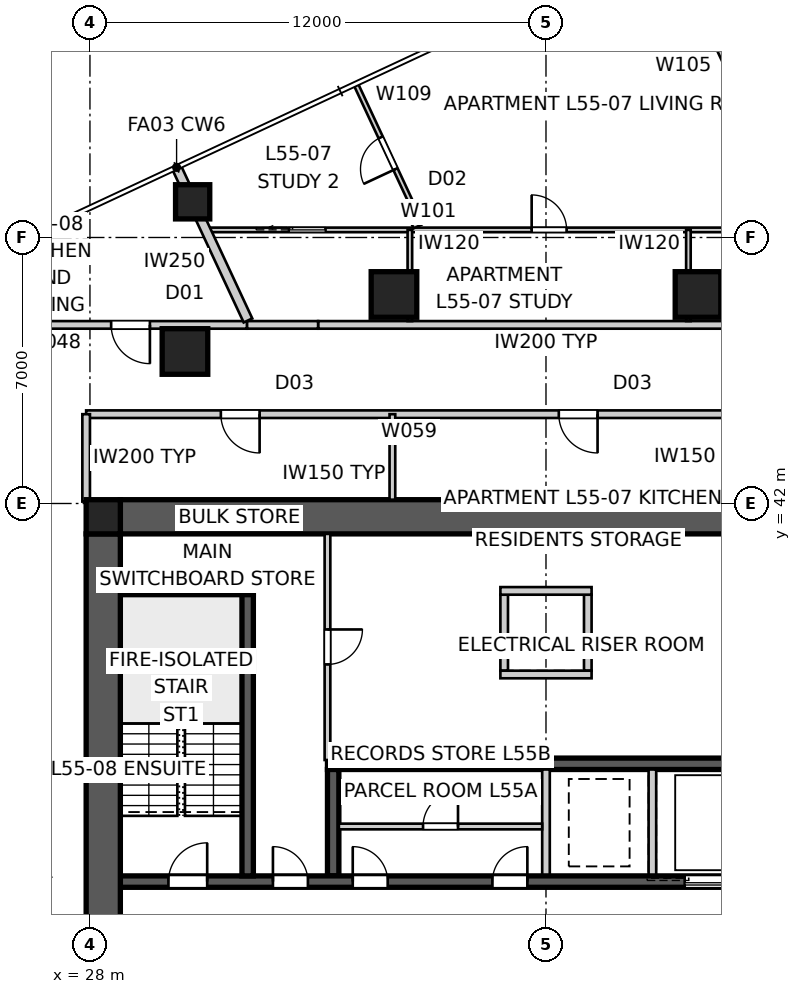
"""IFC4 building model, lengths in metres.
Left out: names, types, materials, properties, quantities, classifications, styles, units other than length and angle.
Written with IfcOpenShell. Run it as: python <this file> out.ifc"""

import sys

from ifc_helpers import new_model, si_unit, direction, frame, frame_2d, origin, origin_2d, place, context, subcontext, project, spatial, polyline, rectangle, outline, extrude, element, fill, save


model = new_model("IFC4")
c1 = context("Model", 3, precision=1e-05, world=origin(), true_north=direction((0.0, 1.0)))
c2 = subcontext(c1, "Body", "Model", "MODEL_VIEW")
j1 = project(units=[si_unit("LENGTHUNIT", "METRE"), si_unit("PLANEANGLEUNIT", "RADIAN")], contexts=[c1])
p1 = place(None, origin())
s1 = spatial("IfcSite", under=j1, at=p1, CompositionType="ELEMENT")
p2 = place(p1, origin())
s2 = spatial("IfcBuilding", under=s1, at=p2, CompositionType="ELEMENT")
p3 = place(p2, frame((0.0, 0.0, 199.8)))
s3 = spatial("IfcBuildingStorey", under=s2, at=p3, CompositionType="ELEMENT", Elevation=199.8)
p4 = place(p3, frame((28.8, 41.65, 0.0), z_axis=(0.0, 0.0, 1.0), x_axis=(1.0, 0.0, 0.0)))
e1 = element("IfcWall", 1, at=p4, inside=s3, PredefinedType="SHEAR", context=c2, shape_type="SweptSolid", body=[
    extrude(outline(polyline([(0.0, -0.45), (22.4, -0.45), (22.4, -0.025), (22.85, -0.025), (22.85, 0.025), (22.4, 0.025), (22.4, 0.45), (0.0, 0.45), (0.0, 0.025), (-0.45, 0.025), (-0.45, -0.025), (0.0, -0.025), (0.0, -0.45)])), origin(), (0.0, 0.0, 1.0), 3.4),
])
p5 = place(p3, frame((28.35, 41.2, 0.0), z_axis=(0.0, 0.0, 1.0), x_axis=(0.0, -1.0, 0.0)))
e2 = element("IfcWall", 2, at=p5, inside=s3, PredefinedType="SHEAR", context=c2, shape_type="SweptSolid", body=[
    extrude(outline(polyline([(0.0, -0.45), (22.4, -0.45), (22.4, -0.025), (22.85, -0.025), (22.85, 0.025), (22.4, 0.025), (22.4, 0.45), (0.0, 0.45), (0.0, 0.025), (-0.45, 0.025), (-0.45, -0.025), (0.0, -0.025), (0.0, -0.45)])), origin(), (0.0, 0.0, 1.0), 3.4),
])
p6 = place(p5, frame((11.14, 0.0, 0.0)))
e3 = element("IfcOpeningElement", 3, at=p6, cuts=e2, PredefinedType="OPENING", context=c2, shape_type="SweptSolid", body=[
    extrude(rectangle(XDim=1.02, YDim=2.4, at=frame_2d((0.51, 1.2))), frame((0.0, 0.46, 0.0), z_axis=(0.0, -1.0, 0.0), x_axis=(1.0, 0.0, 0.0)), (0.0, 0.0, 1.0), 0.92),
])
p7 = place(p3, frame((28.8, 32.05, 0.0), z_axis=(0.0, 0.0, 1.0), x_axis=(1.0, 0.0, 0.0)))
e4 = element("IfcWall", 4, at=p7, inside=s3, PredefinedType="SHEAR", context=c2, shape_type="SweptSolid", body=[
    extrude(rectangle(XDim=22.4, YDim=0.3, at=frame_2d((11.2, 0.0))), origin(), (0.0, 0.0, 1.0), 3.4),
])
p8 = place(p7, frame((19.04, 0.0, 0.0)))
e5 = element("IfcOpeningElement", 5, at=p8, cuts=e4, PredefinedType="OPENING", context=c2, shape_type="SweptSolid", body=[
    extrude(rectangle(XDim=0.92, YDim=2.1, at=frame_2d((0.46, 1.05))), frame((0.0, 0.16, 0.0), z_axis=(0.0, -1.0, 0.0), x_axis=(1.0, 0.0, 0.0)), (0.0, 0.0, 1.0), 0.32),
])
p9 = place(p7, frame((1.265, 0.0, 0.0)))
e6 = element("IfcOpeningElement", 6, at=p9, cuts=e4, PredefinedType="OPENING", context=c2, shape_type="SweptSolid", body=[
    extrude(rectangle(XDim=1.02, YDim=2.1, at=frame_2d((0.51, 1.05))), frame((0.0, 0.16, 0.0), z_axis=(0.0, -1.0, 0.0), x_axis=(1.0, 0.0, 0.0)), (0.0, 0.0, 1.0), 0.32),
])
p10 = place(p7, frame((4.015, 0.0, 0.0)))
e7 = element("IfcOpeningElement", 7, at=p10, cuts=e4, PredefinedType="OPENING", context=c2, shape_type="SweptSolid", body=[
    extrude(rectangle(XDim=0.92, YDim=2.1, at=frame_2d((0.46, 1.05))), frame((0.0, 0.16, 0.0), z_axis=(0.0, -1.0, 0.0), x_axis=(1.0, 0.0, 0.0)), (0.0, 0.0, 1.0), 0.32),
])
p11 = place(p7, frame((6.115, 0.0, 0.0)))
e8 = element("IfcOpeningElement", 8, at=p11, cuts=e4, PredefinedType="OPENING", context=c2, shape_type="SweptSolid", body=[
    extrude(rectangle(XDim=0.92, YDim=2.1, at=frame_2d((0.46, 1.05))), frame((0.0, 0.16, 0.0), z_axis=(0.0, -1.0, 0.0), x_axis=(1.0, 0.0, 0.0)), (0.0, 0.0, 1.0), 0.32),
])
p12 = place(p7, frame((9.79, 0.0, 0.0)))
e9 = element("IfcOpeningElement", 9, at=p12, cuts=e4, PredefinedType="OPENING", context=c2, shape_type="SweptSolid", body=[
    extrude(rectangle(XDim=0.92, YDim=2.1, at=frame_2d((0.46, 1.05))), frame((0.0, 0.16, 0.0), z_axis=(0.0, -1.0, 0.0), x_axis=(1.0, 0.0, 0.0)), (0.0, 0.0, 1.0), 0.32),
])
p13 = place(p7, frame((14.85, 0.0, 0.0)))
e10 = element("IfcOpeningElement", 10, at=p13, cuts=e4, PredefinedType="OPENING", context=c2, shape_type="SweptSolid", body=[
    extrude(rectangle(XDim=1.1, YDim=2.1, at=frame_2d((0.55, 1.05))), frame((0.0, 0.16, 0.0), z_axis=(0.0, -1.0, 0.0), x_axis=(1.0, 0.0, 0.0)), (0.0, 0.0, 1.0), 0.32),
])
p14 = place(p3, frame((34.25, 35.15, 0.0), z_axis=(0.0, 0.0, 1.0), x_axis=(1.0, 0.0, 0.0)))
e11 = element("IfcWall", 11, at=p14, inside=s3, PredefinedType="SHEAR", context=c2, shape_type="SweptSolid", body=[
    extrude(rectangle(XDim=11.5, YDim=0.3, at=frame_2d((5.75, 0.0))), origin(), (0.0, 0.0, 1.0), 3.4),
])
p15 = place(p3, frame((34.4, 32.2, 0.0), z_axis=(0.0, 0.0, 1.0), x_axis=(0.0, 1.0, 0.0)))
e12 = element("IfcWall", 12, at=p15, inside=s3, PredefinedType="SHEAR", context=c2, shape_type="SweptSolid", body=[
    extrude(rectangle(XDim=2.8, YDim=0.3, at=frame_2d((1.4, 0.0))), origin(), (0.0, 0.0, 1.0), 3.4),
])
for number, where, z_axis, x_axis in (
    (13, (40.0, 32.2, 0.0), (0.0, 0.0, 1.0), (0.0, 1.0, 0.0)),
    (14, (42.8, 32.2, 0.0), (0.0, 0.0, 1.0), (0.0, 1.0, 0.0)),
):
    element("IfcWall", number, at=place(p3, frame(where, z_axis=z_axis, x_axis=x_axis)), inside=s3, PredefinedType="SOLIDWALL", context=c2, shape_type="SweptSolid", body=[
        extrude(rectangle(XDim=2.8, YDim=0.2, at=frame_2d((1.4, 0.0))), origin(), (0.0, 0.0, 1.0), 3.4),
    ])
p16 = place(p3, frame((32.15, 32.2, 0.0), z_axis=(0.0, 0.0, 1.0), x_axis=(0.0, 1.0, 0.0)))
e15 = element("IfcWall", 15, at=p16, inside=s3, PredefinedType="SHEAR", context=c2, shape_type="SweptSolid", body=[
    extrude(rectangle(XDim=7.7, YDim=0.3, at=frame_2d((3.85, 0.0))), origin(), (0.0, 0.0, 1.0), 3.4),
])
p17 = place(p3, frame((28.8, 39.75, 0.0), z_axis=(0.0, 0.0, 1.0), x_axis=(1.0, 0.0, 0.0)))
e16 = element("IfcWall", 16, at=p17, inside=s3, PredefinedType="SHEAR", context=c2, shape_type="SweptSolid", body=[
    extrude(rectangle(XDim=3.5, YDim=0.3, at=frame_2d((1.75, 0.0))), origin(), (0.0, 0.0, 1.0), 3.4),
])
for number, where, z_axis, x_axis in (
    (17, (38.9, 37.6, 0.0), (0.0, 0.0, 1.0), (0.0, 1.0, 0.0)),
    (18, (41.1, 37.6, 0.0), (0.0, 0.0, 1.0), (0.0, 1.0, 0.0)),
):
    element("IfcWall", number, at=place(p3, frame(where, z_axis=z_axis, x_axis=x_axis)), inside=s3, PredefinedType="SOLIDWALL", context=c2, shape_type="SweptSolid", body=[
        extrude(rectangle(XDim=2.0, YDim=0.2, at=frame_2d((1.0, 0.0))), origin(), (0.0, 0.0, 1.0), 3.4),
    ])
for number, where, z_axis, x_axis in (
    (19, (38.8, 37.5, 0.0), (0.0, 0.0, 1.0), (1.0, 0.0, 0.0)),
    (20, (38.8, 39.7, 0.0), (0.0, 0.0, 1.0), (1.0, 0.0, 0.0)),
):
    element("IfcWall", number, at=place(p3, frame(where, z_axis=z_axis, x_axis=x_axis)), inside=s3, PredefinedType="SOLIDWALL", context=c2, shape_type="SweptSolid", body=[
        extrude(rectangle(XDim=2.4, YDim=0.2, at=frame_2d((1.2, 0.0))), origin(), (0.0, 0.0, 1.0), 3.4),
    ])
p18 = place(p3, frame((28.35, 41.65, 0.0), z_axis=(0.0, 0.0, 1.0), x_axis=(1.0, 0.0, 0.0)))
e21 = element("IfcColumn", 21, at=p18, inside=s3, PredefinedType="COLUMN", context=c2, shape_type="SweptSolid", body=[
    extrude(rectangle(XDim=0.9, YDim=0.9, at=origin_2d()), origin(), (0.0, 0.0, 1.0), 3.4),
])
p19 = place(p3, frame((30.702, 49.939, 0.0), z_axis=(0.0, 0.0, 1.0), x_axis=(1.0, 0.0, 0.0)))
e22 = element("IfcColumn", 22, at=p19, inside=s3, PredefinedType="COLUMN", context=c2, shape_type="SweptSolid", body=[
    extrude(rectangle(XDim=0.9, YDim=0.9, at=origin_2d()), origin(), (0.0, 0.0, 1.0), 3.2),
])
for number, where, z_axis, x_axis in (
    (23, (44.0, 47.5, 0.0), (0.0, 0.0, 1.0), (1.0, 0.0, 0.0)),
    (24, (36.0, 47.5, 0.0), (0.0, 0.0, 1.0), (1.0, 0.0, 0.0)),
    (25, (30.5, 46.0, 0.0), (0.0, 0.0, 1.0), (1.0, 0.0, 0.0)),
):
    element("IfcColumn", number, at=place(p3, frame(where, z_axis=z_axis, x_axis=x_axis)), inside=s3, PredefinedType="COLUMN", context=c2, shape_type="SweptSolid", body=[
        extrude(rectangle(XDim=1.2, YDim=1.2, at=origin_2d()), origin(), (0.0, 0.0, 1.0), 3.4),
    ])
p20 = place(p3, frame((45.997, 46.7, 0.0), z_axis=(0.0, 0.0, 1.0), x_axis=(-1.0, 0.0, 0.0)))
e26 = element("IfcWall", 26, at=p20, inside=s3, PredefinedType="PARTITIONING", context=c2, shape_type="SweptSolid", body=[
    extrude(rectangle(XDim=11.993, YDim=0.2, at=frame_2d((5.997, 0.0))), origin(), (0.0, 0.0, 1.0), 3.2),
])
p21 = place(p3, frame((34.003, 46.7, 0.0), z_axis=(0.0, 0.0, 1.0), x_axis=(-1.0, 0.0, 0.0)))
e27 = element("IfcWall", 27, at=p21, inside=s3, PredefinedType="PARTITIONING", context=c2, shape_type="SweptSolid", body=[
    extrude(rectangle(XDim=1.874, YDim=0.2, at=frame_2d((0.937, 0.0))), origin(), (0.0, 0.0, 1.0), 2.2),
])
p22 = place(p3, frame((32.13, 46.7, 0.0), z_axis=(0.0, 0.0, 1.0), x_axis=(-1.0, 0.0, 0.0)))
e28 = element("IfcWall", 28, at=p22, inside=s3, PredefinedType="PARTITIONING", context=c2, shape_type="SweptSolid", body=[
    extrude(rectangle(XDim=6.63, YDim=0.2, at=frame_2d((3.315, 0.0))), origin(), (0.0, 0.0, 1.0), 3.2),
])
p23 = place(p22, frame((2.552, 0.0, 0.0)))
e29 = element("IfcOpeningElement", 29, at=p23, cuts=e28, PredefinedType="OPENING", context=c2, shape_type="SweptSolid", body=[
    extrude(rectangle(XDim=1.02, YDim=2.34, at=frame_2d((0.51, 1.17))), frame((0.0, 0.11, 0.0), z_axis=(0.0, -1.0, 0.0), x_axis=(1.0, 0.0, 0.0)), (0.0, 0.0, 1.0), 0.22),
])
p24 = place(p3, frame((30.28, 50.845, 0.0), z_axis=(0.0, 0.0, 1.0), x_axis=(0.422614816594, -0.906309393527, 0.0)))
e30 = element("IfcWall", 30, at=p24, inside=s3, PredefinedType="PARTITIONING", context=c2, shape_type="SweptSolid", body=[
    extrude(rectangle(XDim=4.445, YDim=0.25, at=frame_2d((2.222, 0.0))), origin(), (0.0, 0.0, 1.0), 3.2),
])
p25 = place(p3, frame((34.25, 41.2, 0.0), z_axis=(0.0, 0.0, 1.0), x_axis=(0.0, -1.0, 0.0)))
e31 = element("IfcWall", 31, at=p25, inside=s3, PredefinedType="SOLIDWALL", context=c2, shape_type="SweptSolid", body=[
    extrude(rectangle(XDim=5.95, YDim=0.15, at=frame_2d((2.975, 0.0))), origin(), (0.0, 0.0, 1.0), 3.2),
])
p26 = place(p25, frame((2.515, 0.0, 0.0)))
e32 = element("IfcOpeningElement", 32, at=p26, cuts=e31, PredefinedType="OPENING", context=c2, shape_type="SweptSolid", body=[
    extrude(rectangle(XDim=0.92, YDim=2.1, at=frame_2d((0.46, 1.05))), frame((0.0, 0.085, 0.0), z_axis=(0.0, -1.0, 0.0), x_axis=(1.0, 0.0, 0.0)), (0.0, 0.0, 1.0), 0.17),
])
p27 = place(p3, frame((52.1, 44.35, 0.0), z_axis=(0.0, 0.0, 1.0), x_axis=(-1.0, 0.0, 0.0)))
e33 = element("IfcWall", 33, at=p27, inside=s3, PredefinedType="PARTITIONING", context=c2, shape_type="SweptSolid", body=[
    extrude(rectangle(XDim=24.2, YDim=0.2, at=frame_2d((12.1, 0.0))), origin(), (0.0, 0.0, 1.0), 3.2),
])
p28 = place(p27, frame((10.743, 0.0, 0.0)))
e34 = element("IfcOpeningElement", 34, at=p28, cuts=e33, PredefinedType="OPENING", context=c2, shape_type="SweptSolid", body=[
    extrude(rectangle(XDim=1.02, YDim=2.1, at=frame_2d((0.51, 1.05))), frame((0.0, 0.11, 0.0), z_axis=(0.0, -1.0, 0.0), x_axis=(1.0, 0.0, 0.0)), (0.0, 0.0, 1.0), 0.22),
])
p29 = place(p27, frame((19.636, 0.0, 0.0)))
e35 = element("IfcOpeningElement", 35, at=p29, cuts=e33, PredefinedType="OPENING", context=c2, shape_type="SweptSolid", body=[
    extrude(rectangle(XDim=1.02, YDim=2.1, at=frame_2d((0.51, 1.05))), frame((0.0, 0.11, 0.0), z_axis=(0.0, -1.0, 0.0), x_axis=(1.0, 0.0, 0.0)), (0.0, 0.0, 1.0), 0.22),
])
p30 = place(p27, frame((3.297, 0.0, 0.0)))
e36 = element("IfcOpeningElement", 36, at=p30, cuts=e33, PredefinedType="OPENING", context=c2, shape_type="SweptSolid", body=[
    extrude(rectangle(XDim=1.02, YDim=2.1, at=frame_2d((0.51, 1.05))), frame((0.0, 0.11, 0.0), z_axis=(0.0, -1.0, 0.0), x_axis=(1.0, 0.0, 0.0)), (0.0, 0.0, 1.0), 0.22),
])
p31 = place(p3, frame((27.9, 44.35, 0.0), z_axis=(0.0, 0.0, 1.0), x_axis=(0.0, -1.0, 0.0)))
e37 = element("IfcWall", 37, at=p31, inside=s3, PredefinedType="PARTITIONING", context=c2, shape_type="SweptSolid", body=[
    extrude(rectangle(XDim=2.3, YDim=0.2, at=frame_2d((1.15, 0.0))), origin(), (0.0, 0.0, 1.0), 3.2),
])
p32 = place(p3, frame((35.958, 42.1, 0.0), z_axis=(0.0, 0.0, 1.0), x_axis=(0.0, 1.0, 0.0)))
e38 = element("IfcWall", 38, at=p32, inside=s3, PredefinedType="SOLIDWALL", context=c2, shape_type="SweptSolid", body=[
    extrude(rectangle(XDim=2.25, YDim=0.15, at=frame_2d((1.125, 0.0))), origin(), (0.0, 0.0, 1.0), 3.2),
])
p33 = place(p3, frame((31.047, 49.2, 0.0), z_axis=(0.0, 0.0, 1.0), x_axis=(1.0, 0.0, 0.0)))
e39 = element("IfcWall", 39, at=p33, inside=s3, PredefinedType="PARTITIONING", context=c2, shape_type="SweptSolid", body=[
    extrude(rectangle(XDim=25.333, YDim=0.12, at=frame_2d((12.667, 0.0))), origin(), (0.0, 0.0, 1.0), 3.2),
])
p34 = place(p33, frame((14.154, 0.0, 0.0)))
e40 = element("IfcOpeningElement", 40, at=p34, cuts=e39, PredefinedType="OPENING", context=c2, shape_type="SweptSolid", body=[
    extrude(rectangle(XDim=0.92, YDim=2.34, at=frame_2d((0.46, 1.17))), frame((0.0, 0.07, 0.0), z_axis=(0.0, -1.0, 0.0), x_axis=(1.0, 0.0, 0.0)), (0.0, 0.0, 1.0), 0.14),
])
p35 = place(p33, frame((18.62, 0.0, 0.0)))
e41 = element("IfcOpeningElement", 41, at=p35, cuts=e39, PredefinedType="OPENING", context=c2, shape_type="SweptSolid", body=[
    extrude(rectangle(XDim=0.92, YDim=2.34, at=frame_2d((0.46, 1.17))), frame((0.0, 0.07, 0.0), z_axis=(0.0, -1.0, 0.0), x_axis=(1.0, 0.0, 0.0)), (0.0, 0.0, 1.0), 0.14),
])
p36 = place(p33, frame((8.576, 0.0, 0.0)))
e42 = element("IfcOpeningElement", 42, at=p36, cuts=e39, PredefinedType="OPENING", context=c2, shape_type="SweptSolid", body=[
    extrude(rectangle(XDim=0.92, YDim=2.34, at=frame_2d((0.46, 1.17))), frame((0.0, 0.07, 0.0), z_axis=(0.0, -1.0, 0.0), x_axis=(1.0, 0.0, 0.0)), (0.0, 0.0, 1.0), 0.14),
])
p37 = place(p33, frame((2.19, 0.0, 0.0)))
e43 = element("IfcOpeningElement", 43, at=p37, cuts=e39, PredefinedType="OPENING", context=c2, shape_type="SweptSolid", body=[
    extrude(rectangle(XDim=0.96, YDim=2.1, at=frame_2d((0.48, 1.05))), frame((0.0, 0.07, 0.0), z_axis=(0.0, -1.0, 0.0), x_axis=(1.0, 0.0, 0.0)), (0.0, 0.0, 1.0), 0.14),
])
for number, where, z_axis, x_axis in (
    (44, (43.748, 46.8, 0.0), (0.0, 0.0, 1.0), (0.0, 1.0, 0.0)),
    (45, (36.418, 49.2, 0.0), (0.0, 0.0, 1.0), (0.0, -1.0, 0.0)),
):
    element("IfcWall", number, at=place(p3, frame(where, z_axis=z_axis, x_axis=x_axis)), inside=s3, PredefinedType="PARTITIONING", context=c2, shape_type="SweptSolid", body=[
        extrude(rectangle(XDim=2.4, YDim=0.12, at=frame_2d((1.2, 0.0))), origin(), (0.0, 0.0, 1.0), 3.2),
    ])
p38 = place(p3, frame((43.211, 56.831, 0.0), z_axis=(0.0, 0.0, 1.0), x_axis=(0.422671204118, -0.906283097718, 0.0)))
e46 = element("IfcWall", 46, at=p38, inside=s3, PredefinedType="PARTITIONING", context=c2, shape_type="SweptSolid", body=[
    extrude(rectangle(XDim=3.93, YDim=0.12, at=frame_2d((1.965, 0.0))), origin(), (0.0, 0.0, 1.0), 3.2),
])
p39 = place(p38, frame((1.485, 0.0, 0.0)))
e47 = element("IfcOpeningElement", 47, at=p39, cuts=e46, PredefinedType="OPENING", context=c2, shape_type="SweptSolid", body=[
    extrude(rectangle(XDim=0.92, YDim=2.34, at=frame_2d((0.46, 1.17))), frame((0.0, 0.07, 0.0), z_axis=(0.0, -1.0, 0.0), x_axis=(1.0, 0.0, 0.0)), (0.0, 0.0, 1.0), 0.14),
])
p40 = place(p3, frame((36.492, 49.295, 0.0), z_axis=(0.0, 0.0, 1.0), x_axis=(0.906653589403, 0.421875892677, 0.0)))
e48 = element("IfcWall", 48, at=p40, inside=s3, PredefinedType="PARTITIONING", context=c2, shape_type="SweptSolid", body=[
    extrude(rectangle(XDim=0.225, YDim=0.12, at=frame_2d((0.113, 0.0))), origin(), (0.0, 0.0, 1.0), 3.2),
])
p41 = place(p3, frame((36.697, 49.39, 0.0), z_axis=(0.0, 0.0, 1.0), x_axis=(-0.422771582019, 0.906236276827, 0.0)))
e49 = element("IfcWall", 49, at=p41, inside=s3, PredefinedType="PARTITIONING", context=c2, shape_type="SweptSolid", body=[
    extrude(rectangle(XDim=3.99, YDim=0.12, at=frame_2d((1.995, 0.0))), origin(), (0.0, 0.0, 1.0), 3.2),
])
p42 = place(p41, frame((1.555, 0.0, 0.0)))
e50 = element("IfcOpeningElement", 50, at=p42, cuts=e49, PredefinedType="OPENING", context=c2, shape_type="SweptSolid", body=[
    extrude(rectangle(XDim=0.92, YDim=2.34, at=frame_2d((0.46, 1.17))), frame((0.0, 0.07, 0.0), z_axis=(0.0, -1.0, 0.0), x_axis=(1.0, 0.0, 0.0)), (0.0, 0.0, 1.0), 0.14),
])
p43 = place(p3, frame((34.55, 33.5, 0.0), z_axis=(0.0, 0.0, 1.0), x_axis=(1.0, 0.0, 0.0)))
e51 = element("IfcWall", 51, at=p43, inside=s3, PredefinedType="SOLIDWALL", context=c2, shape_type="SweptSolid", body=[
    extrude(rectangle(XDim=5.35, YDim=0.15, at=frame_2d((2.675, 0.0))), origin(), (0.0, 0.0, 1.0), 3.2),
])
p44 = place(p43, frame((2.215, 0.0, 0.0)))
e52 = element("IfcOpeningElement", 52, at=p44, cuts=e51, PredefinedType="OPENING", context=c2, shape_type="SweptSolid", body=[
    extrude(rectangle(XDim=0.92, YDim=2.1, at=frame_2d((0.46, 1.05))), frame((0.0, 0.085, 0.0), z_axis=(0.0, -1.0, 0.0), x_axis=(1.0, 0.0, 0.0)), (0.0, 0.0, 1.0), 0.17),
])
p45 = place(p9, origin())
e53 = element("IfcDoor", 53, at=p45, inside=s3, OperationType="SINGLE_SWING_RIGHT", PredefinedType="DOOR", context=c2, shape_type="SweptSolid", body=[
    extrude(rectangle(XDim=1.02, YDim=2.1, at=frame_2d((0.51, 1.05))), frame((0.0, 0.025, 0.0), z_axis=(0.0, -1.0, 0.0), x_axis=(1.0, 0.0, 0.0)), (0.0, 0.0, 1.0), 0.05),
])
fill(e6, e53)
p46 = place(p10, origin())
e54 = element("IfcDoor", 54, at=p46, inside=s3, OperationType="SINGLE_SWING_LEFT", PredefinedType="DOOR", context=c2, shape_type="SweptSolid", body=[
    extrude(rectangle(XDim=0.92, YDim=2.1, at=frame_2d((0.46, 1.05))), frame((0.0, 0.025, 0.0), z_axis=(0.0, -1.0, 0.0), x_axis=(1.0, 0.0, 0.0)), (0.0, 0.0, 1.0), 0.05),
])
fill(e7, e54)
p47 = place(p28, origin())
e55 = element("IfcDoor", 55, at=p47, inside=s3, OperationType="SINGLE_SWING_LEFT", PredefinedType="DOOR", context=c2, shape_type="SweptSolid", body=[
    extrude(rectangle(XDim=1.02, YDim=2.1, at=frame_2d((0.51, 1.05))), frame((0.0, 0.025, 0.0), z_axis=(0.0, -1.0, 0.0), x_axis=(1.0, 0.0, 0.0)), (0.0, 0.0, 1.0), 0.05),
])
fill(e34, e55)
p48 = place(p29, origin())
e56 = element("IfcDoor", 56, at=p48, inside=s3, OperationType="SINGLE_SWING_LEFT", PredefinedType="DOOR", context=c2, shape_type="SweptSolid", body=[
    extrude(rectangle(XDim=1.02, YDim=2.1, at=frame_2d((0.51, 1.05))), frame((0.0, 0.025, 0.0), z_axis=(0.0, -1.0, 0.0), x_axis=(1.0, 0.0, 0.0)), (0.0, 0.0, 1.0), 0.05),
])
fill(e35, e56)
p49 = place(p23, origin())
e57 = element("IfcDoor", 57, at=p49, inside=s3, OperationType="SINGLE_SWING_LEFT", PredefinedType="DOOR", context=c2, shape_type="SweptSolid", body=[
    extrude(rectangle(XDim=1.02, YDim=2.34, at=frame_2d((0.51, 1.17))), frame((0.0, 0.025, 0.0), z_axis=(0.0, -1.0, 0.0), x_axis=(1.0, 0.0, 0.0)), (0.0, 0.0, 1.0), 0.05),
])
fill(e29, e57)
p50 = place(p26, origin())
e58 = element("IfcDoor", 58, at=p50, inside=s3, OperationType="SINGLE_SWING_LEFT", PredefinedType="DOOR", context=c2, shape_type="SweptSolid", body=[
    extrude(rectangle(XDim=0.92, YDim=2.1, at=frame_2d((0.46, 1.05))), frame((0.0, 0.025, 0.0), z_axis=(0.0, -1.0, 0.0), x_axis=(1.0, 0.0, 0.0)), (0.0, 0.0, 1.0), 0.05),
])
fill(e32, e58)
p51 = place(p36, origin())
e59 = element("IfcDoor", 59, at=p51, inside=s3, OperationType="SINGLE_SWING_LEFT", PredefinedType="DOOR", context=c2, shape_type="SweptSolid", body=[
    extrude(rectangle(XDim=0.92, YDim=2.34, at=frame_2d((0.46, 1.17))), frame((0.0, 0.025, 0.0), z_axis=(0.0, -1.0, 0.0), x_axis=(1.0, 0.0, 0.0)), (0.0, 0.0, 1.0), 0.05),
])
fill(e42, e59)
p52 = place(p42, origin())
e60 = element("IfcDoor", 60, at=p52, inside=s3, OperationType="SINGLE_SWING_LEFT", PredefinedType="DOOR", context=c2, shape_type="SweptSolid", body=[
    extrude(rectangle(XDim=0.92, YDim=2.34, at=frame_2d((0.46, 1.17))), frame((0.0, 0.025, 0.0), z_axis=(0.0, -1.0, 0.0), x_axis=(1.0, 0.0, 0.0)), (0.0, 0.0, 1.0), 0.05),
])
fill(e50, e60)
p53 = place(p37, origin())
e61 = element("IfcDoor", 61, at=p53, inside=s3, OperationType="SLIDING_TO_LEFT", PredefinedType="DOOR", context=c2, shape_type="SweptSolid", body=[
    extrude(rectangle(XDim=0.96, YDim=2.1, at=frame_2d((0.48, 1.05))), frame((0.0, 0.025, 0.0), z_axis=(0.0, -1.0, 0.0), x_axis=(1.0, 0.0, 0.0)), (0.0, 0.0, 1.0), 0.05),
])
fill(e43, e61)
p54 = place(p11, origin())
e62 = element("IfcDoor", 62, at=p54, inside=s3, OperationType="SINGLE_SWING_LEFT", PredefinedType="DOOR", context=c2, shape_type="SweptSolid", body=[
    extrude(rectangle(XDim=0.92, YDim=2.1, at=frame_2d((0.46, 1.05))), frame((0.0, 0.025, 0.0), z_axis=(0.0, -1.0, 0.0), x_axis=(1.0, 0.0, 0.0)), (0.0, 0.0, 1.0), 0.05),
])
fill(e8, e62)
p55 = place(p12, origin())
e63 = element("IfcDoor", 63, at=p55, inside=s3, OperationType="SINGLE_SWING_RIGHT", PredefinedType="DOOR", context=c2, shape_type="SweptSolid", body=[
    extrude(rectangle(XDim=0.92, YDim=2.1, at=frame_2d((0.46, 1.05))), frame((0.0, 0.025, 0.0), z_axis=(0.0, -1.0, 0.0), x_axis=(1.0, 0.0, 0.0)), (0.0, 0.0, 1.0), 0.05),
])
fill(e9, e63)
p56 = place(p44, origin())
e64 = element("IfcDoor", 64, at=p56, inside=s3, OperationType="SINGLE_SWING_RIGHT", PredefinedType="DOOR", context=c2, shape_type="SweptSolid", body=[
    extrude(rectangle(XDim=0.92, YDim=2.1, at=frame_2d((0.46, 1.05))), frame((0.0, 0.025, 0.0), z_axis=(0.0, -1.0, 0.0), x_axis=(1.0, 0.0, 0.0)), (0.0, 0.0, 1.0), 0.05),
])
fill(e52, e64)
p57 = place(p13, origin())
e65 = element("IfcDoor", 65, at=p57, inside=s3, OperationType="SLIDING_TO_LEFT", PredefinedType="DOOR", context=c2, shape_type="SweptSolid", body=[
    extrude(rectangle(XDim=1.1, YDim=2.1, at=frame_2d((0.55, 1.05))), frame((0.0, 0.025, 0.0), z_axis=(0.0, -1.0, 0.0), x_axis=(1.0, 0.0, 0.0)), (0.0, 0.0, 1.0), 0.05),
])
fill(e10, e65)
save(model, sys.argv[1])
